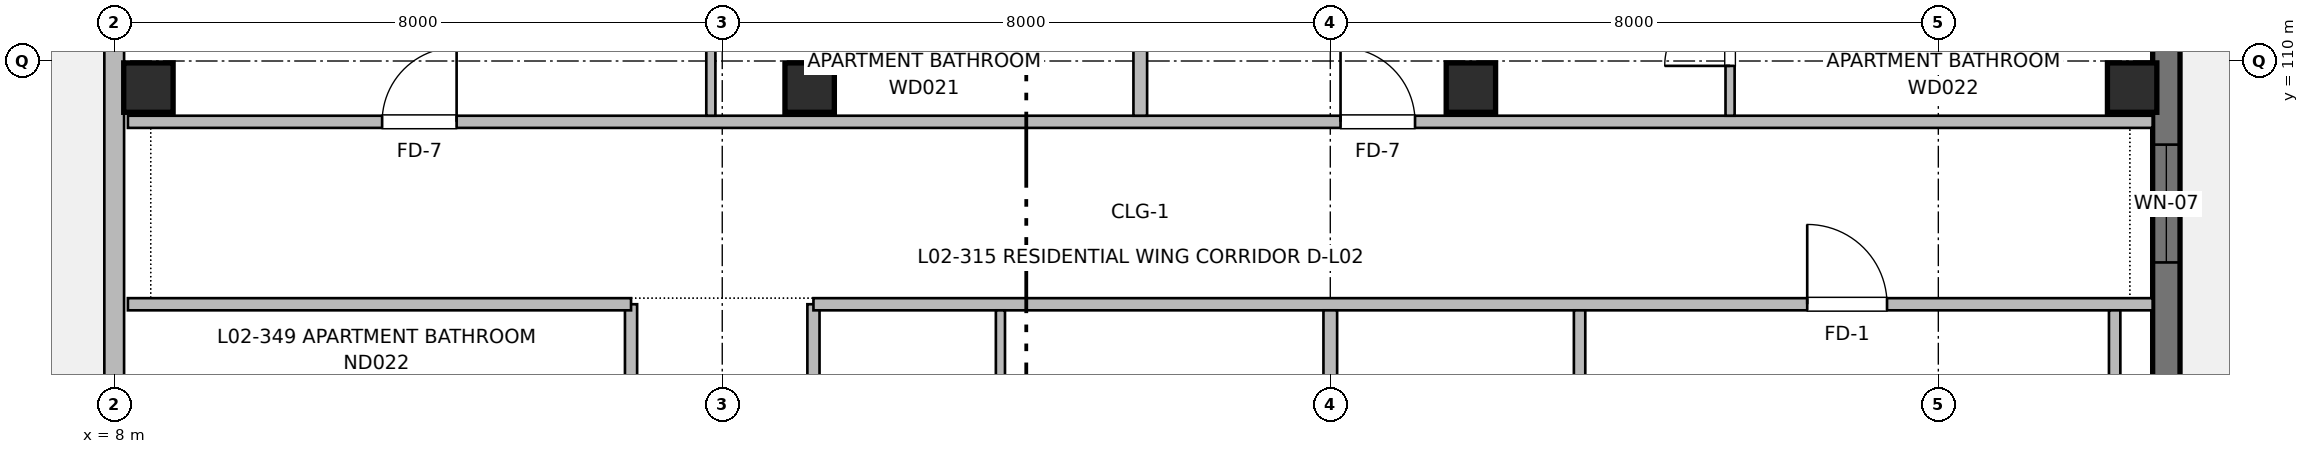
"""IFC4 building model, lengths in metres.
Left out: names, types, materials, properties, quantities, classifications, styles, units other than length and angle.
Written with IfcOpenShell. Run it as: python <this file> out.ifc"""

import sys

from ifc_helpers import new_model, si_unit, direction, frame, frame_2d, origin, origin_2d, place, context, subcontext, project, spatial, rectangle, extrude, element, fill, save


model = new_model("IFC4")
c1 = context("Model", 3, precision=1e-05, world=origin(), true_north=direction((0.0, 1.0)))
c2 = subcontext(c1, "Body", "Model", "MODEL_VIEW")
j1 = project(units=[si_unit("LENGTHUNIT", "METRE"), si_unit("PLANEANGLEUNIT", "RADIAN")], contexts=[c1])
p1 = place(None, origin())
s1 = spatial("IfcSite", under=j1, at=p1, CompositionType="ELEMENT")
p2 = place(p1, origin())
s2 = spatial("IfcBuilding", under=s1, at=p2, CompositionType="ELEMENT")
p3 = place(p2, frame((0.0, 0.0, 7.36)))
s3 = spatial("IfcBuildingStorey", under=s2, at=p3, CompositionType="ELEMENT", Elevation=7.36)
for number, where, z_axis, x_axis in (
    (1, (8.45, 109.65, 0.0), (0.0, 0.0, 1.0), (1.0, 0.0, 0.0)),
    (2, (17.15, 109.65, 0.0), (0.0, 0.0, 1.0), (1.0, 0.0, 0.0)),
    (3, (25.85, 109.65, 0.0), (0.0, 0.0, 1.0), (1.0, 0.0, 0.0)),
    (4, (34.55, 109.65, 0.0), (0.0, 0.0, 1.0), (1.0, 0.0, 0.0)),
):
    element("IfcColumn", number, at=place(p3, frame(where, z_axis=z_axis, x_axis=x_axis)), inside=s3, PredefinedType="COLUMN", context=c2, shape_type="SweptSolid", body=[
        extrude(rectangle(XDim=0.65, YDim=0.65, at=origin_2d()), origin(), (0.0, 0.0, 1.0), 3.2),
    ])
p4 = place(p3, frame((35.0, 116.0, 0.0), z_axis=(0.0, 0.0, 1.0), x_axis=(0.0, -1.0, 0.0)))
e5 = element("IfcWall", 5, at=p4, inside=s3, PredefinedType="SHEAR", context=c2, shape_type="SweptSolid", body=[
    extrude(rectangle(XDim=16.0, YDim=0.36, at=frame_2d((8.0, 0.0))), origin(), (0.0, 0.0, 1.0), 2.98),
])
p5 = place(p4, frame((2.95, 0.0, 0.0)))
e6 = element("IfcOpeningElement", 6, at=p5, cuts=e5, PredefinedType="OPENING", context=c2, shape_type="SweptSolid", body=[
    extrude(rectangle(XDim=1.2, YDim=2.2, at=frame_2d((0.6, 1.1))), frame((0.0, 0.19, 0.0), z_axis=(0.0, -1.0, 0.0), x_axis=(1.0, 0.0, 0.0)), (0.0, 0.0, 1.0), 0.38),
])
p6 = place(p4, frame((7.1, 0.0, 0.82)))
e7 = element("IfcOpeningElement", 7, at=p6, cuts=e5, PredefinedType="OPENING", context=c2, shape_type="SweptSolid", body=[
    extrude(rectangle(XDim=1.55, YDim=1.4, at=frame_2d((0.775, 0.7))), frame((0.0, 0.19, 0.0), z_axis=(0.0, -1.0, 0.0), x_axis=(1.0, 0.0, 0.0)), (0.0, 0.0, 1.0), 0.38),
])
p7 = place(p4, frame((11.25, 0.0, 0.82)))
e8 = element("IfcOpeningElement", 8, at=p7, cuts=e5, PredefinedType="OPENING", context=c2, shape_type="SweptSolid", body=[
    extrude(rectangle(XDim=1.5, YDim=1.4, at=frame_2d((0.75, 0.7))), frame((0.0, 0.19, 0.0), z_axis=(0.0, -1.0, 0.0), x_axis=(1.0, 0.0, 0.0)), (0.0, 0.0, 1.0), 0.38),
])
p8 = place(p3, frame((8.0, 56.0, 0.0), z_axis=(0.0, 0.0, 1.0), x_axis=(0.0, 1.0, 0.0)))
e9 = element("IfcWall", 9, at=p8, inside=s3, PredefinedType="SOLIDWALL", context=c2, shape_type="SweptSolid", body=[
    extrude(rectangle(XDim=60.0, YDim=0.26, at=frame_2d((30.0, 0.0))), origin(), (0.0, 0.0, 1.0), 2.98),
])
p9 = place(p8, frame((4.886, 0.0, 0.0)))
e10 = element("IfcOpeningElement", 10, at=p9, cuts=e9, PredefinedType="OPENING", context=c2, shape_type="SweptSolid", body=[
    extrude(rectangle(XDim=1.2, YDim=2.2, at=frame_2d((0.6, 1.1))), frame((0.0, 0.14, 0.0), z_axis=(0.0, -1.0, 0.0), x_axis=(1.0, 0.0, 0.0)), (0.0, 0.0, 1.0), 0.28),
])
p10 = place(p8, frame((12.107, 0.0, 0.82)))
e11 = element("IfcOpeningElement", 11, at=p10, cuts=e9, PredefinedType="OPENING", context=c2, shape_type="SweptSolid", body=[
    extrude(rectangle(XDim=1.5, YDim=1.4, at=frame_2d((0.75, 0.7))), frame((0.0, 0.14, 0.0), z_axis=(0.0, -1.0, 0.0), x_axis=(1.0, 0.0, 0.0)), (0.0, 0.0, 1.0), 0.28),
])
p11 = place(p8, frame((19.804, 0.0, 0.82)))
e12 = element("IfcOpeningElement", 12, at=p11, cuts=e9, PredefinedType="OPENING", context=c2, shape_type="SweptSolid", body=[
    extrude(rectangle(XDim=1.55, YDim=1.4, at=frame_2d((0.775, 0.7))), frame((0.0, 0.14, 0.0), z_axis=(0.0, -1.0, 0.0), x_axis=(1.0, 0.0, 0.0)), (0.0, 0.0, 1.0), 0.28),
])
p12 = place(p8, frame((29.3, 0.0, 0.87)))
e13 = element("IfcOpeningElement", 13, at=p12, cuts=e9, PredefinedType="OPENING", context=c2, shape_type="SweptSolid", body=[
    extrude(rectangle(XDim=1.4, YDim=1.35, at=frame_2d((0.7, 0.675))), frame((0.0, 0.14, 0.0), z_axis=(0.0, -1.0, 0.0), x_axis=(1.0, 0.0, 0.0)), (0.0, 0.0, 1.0), 0.28),
])
p13 = place(p8, frame((40.946, 0.0, 0.87)))
e14 = element("IfcOpeningElement", 14, at=p13, cuts=e9, PredefinedType="OPENING", context=c2, shape_type="SweptSolid", body=[
    extrude(rectangle(XDim=1.25, YDim=1.35, at=frame_2d((0.625, 0.675))), frame((0.0, 0.14, 0.0), z_axis=(0.0, -1.0, 0.0), x_axis=(1.0, 0.0, 0.0)), (0.0, 0.0, 1.0), 0.28),
])
p14 = place(p8, frame((46.493, 0.0, 0.82)))
e15 = element("IfcOpeningElement", 15, at=p14, cuts=e9, PredefinedType="OPENING", context=c2, shape_type="SweptSolid", body=[
    extrude(rectangle(XDim=1.3, YDim=1.4, at=frame_2d((0.65, 0.7))), frame((0.0, 0.14, 0.0), z_axis=(0.0, -1.0, 0.0), x_axis=(1.0, 0.0, 0.0)), (0.0, 0.0, 1.0), 0.28),
])
p15 = place(p8, frame((55.514, 0.0, 0.67)))
e16 = element("IfcOpeningElement", 16, at=p15, cuts=e9, PredefinedType="OPENING", context=c2, shape_type="SweptSolid", body=[
    extrude(rectangle(XDim=2.1, YDim=1.55, at=frame_2d((1.05, 0.775))), frame((0.0, 0.14, 0.0), z_axis=(0.0, -1.0, 0.0), x_axis=(1.0, 0.0, 0.0)), (0.0, 0.0, 1.0), 0.28),
])
p16 = place(p3, frame((14.8, 56.18, 0.0), z_axis=(0.0, 0.0, 1.0), x_axis=(0.0, 1.0, 0.0)))
e17 = element("IfcWall", 17, at=p16, inside=s3, PredefinedType="PARTITIONING", context=c2, shape_type="SweptSolid", body=[
    extrude(rectangle(XDim=50.62, YDim=0.16, at=frame_2d((25.31, 0.0))), origin(), (0.0, 0.0, 1.0), 2.935),
])
p17 = place(p16, frame((12.82, 0.0, 0.0)))
e18 = element("IfcOpeningElement", 18, at=p17, cuts=e17, PredefinedType="OPENING", context=c2, shape_type="SweptSolid", body=[
    extrude(rectangle(XDim=1.1, YDim=2.15, at=frame_2d((0.55, 1.075))), frame((0.0, 0.09, 0.0), z_axis=(0.0, -1.0, 0.0), x_axis=(1.0, 0.0, 0.0)), (0.0, 0.0, 1.0), 0.18),
])
p18 = place(p16, frame((19.22, 0.0, 0.0)))
e19 = element("IfcOpeningElement", 19, at=p18, cuts=e17, PredefinedType="OPENING", context=c2, shape_type="SweptSolid", body=[
    extrude(rectangle(XDim=1.6, YDim=2.15, at=frame_2d((0.8, 1.075))), frame((0.0, 0.09, 0.0), z_axis=(0.0, -1.0, 0.0), x_axis=(1.0, 0.0, 0.0)), (0.0, 0.0, 1.0), 0.18),
])
p19 = place(p16, frame((1.8, 0.0, 0.0)))
e20 = element("IfcOpeningElement", 20, at=p19, cuts=e17, PredefinedType="OPENING", context=c2, shape_type="SweptSolid", body=[
    extrude(rectangle(XDim=0.96, YDim=2.15, at=frame_2d((0.48, 1.075))), frame((0.0, 0.09, 0.0), z_axis=(0.0, -1.0, 0.0), x_axis=(1.0, 0.0, 0.0)), (0.0, 0.0, 1.0), 0.18),
])
p20 = place(p16, frame((32.625, 0.0, 0.0)))
e21 = element("IfcOpeningElement", 21, at=p20, cuts=e17, PredefinedType="OPENING", context=c2, shape_type="SweptSolid", body=[
    extrude(rectangle(XDim=0.98, YDim=2.15, at=frame_2d((0.49, 1.075))), frame((0.0, 0.09, 0.0), z_axis=(0.0, -1.0, 0.0), x_axis=(1.0, 0.0, 0.0)), (0.0, 0.0, 1.0), 0.18),
])
p21 = place(p16, frame((41.235, 0.0, 0.0)))
e22 = element("IfcOpeningElement", 22, at=p21, cuts=e17, PredefinedType="OPENING", context=c2, shape_type="SweptSolid", body=[
    extrude(rectangle(XDim=0.98, YDim=2.15, at=frame_2d((0.49, 1.075))), frame((0.0, 0.09, 0.0), z_axis=(0.0, -1.0, 0.0), x_axis=(1.0, 0.0, 0.0)), (0.0, 0.0, 1.0), 0.18),
])
p22 = place(p3, frame((17.2, 56.18, 0.0), z_axis=(0.0, 0.0, 1.0), x_axis=(0.0, 1.0, 0.0)))
e23 = element("IfcWall", 23, at=p22, inside=s3, PredefinedType="PARTITIONING", context=c2, shape_type="SweptSolid", body=[
    extrude(rectangle(XDim=50.62, YDim=0.16, at=frame_2d((25.31, 0.0))), origin(), (0.0, 0.0, 1.0), 2.935),
])
p23 = place(p22, frame((7.68, 0.0, 0.0)))
e24 = element("IfcOpeningElement", 24, at=p23, cuts=e23, PredefinedType="OPENING", context=c2, shape_type="SweptSolid", body=[
    extrude(rectangle(XDim=0.98, YDim=2.15, at=frame_2d((0.49, 1.075))), frame((0.0, 0.09, 0.0), z_axis=(0.0, -1.0, 0.0), x_axis=(1.0, 0.0, 0.0)), (0.0, 0.0, 1.0), 0.18),
])
p24 = place(p22, frame((22.43, 0.0, 0.0)))
e25 = element("IfcOpeningElement", 25, at=p24, cuts=e23, PredefinedType="OPENING", context=c2, shape_type="SweptSolid", body=[
    extrude(rectangle(XDim=0.98, YDim=2.15, at=frame_2d((0.49, 1.075))), frame((0.0, 0.09, 0.0), z_axis=(0.0, -1.0, 0.0), x_axis=(1.0, 0.0, 0.0)), (0.0, 0.0, 1.0), 0.18),
])
p25 = place(p22, frame((35.65, 0.0, 0.0)))
e26 = element("IfcOpeningElement", 26, at=p25, cuts=e23, PredefinedType="OPENING", context=c2, shape_type="SweptSolid", body=[
    extrude(rectangle(XDim=0.98, YDim=2.15, at=frame_2d((0.49, 1.075))), frame((0.0, 0.09, 0.0), z_axis=(0.0, -1.0, 0.0), x_axis=(1.0, 0.0, 0.0)), (0.0, 0.0, 1.0), 0.18),
])
p26 = place(p22, frame((46.42, 0.0, 0.0)))
e27 = element("IfcOpeningElement", 27, at=p26, cuts=e23, PredefinedType="OPENING", context=c2, shape_type="SweptSolid", body=[
    extrude(rectangle(XDim=0.98, YDim=2.15, at=frame_2d((0.49, 1.075))), frame((0.0, 0.09, 0.0), z_axis=(0.0, -1.0, 0.0), x_axis=(1.0, 0.0, 0.0)), (0.0, 0.0, 1.0), 0.18),
])
p27 = place(p3, frame((8.18, 106.8, 0.0), z_axis=(0.0, 0.0, 1.0), x_axis=(1.0, 0.0, 0.0)))
e28 = element("IfcWall", 28, at=p27, inside=s3, PredefinedType="PARTITIONING", context=c2, shape_type="SweptSolid", body=[
    extrude(rectangle(XDim=6.62, YDim=0.16, at=frame_2d((3.31, 0.0))), origin(), (0.0, 0.0, 1.0), 2.935),
])
p28 = place(p3, frame((17.2, 106.8, 0.0), z_axis=(0.0, 0.0, 1.0), x_axis=(1.0, 0.0, 0.0)))
e29 = element("IfcWall", 29, at=p28, inside=s3, PredefinedType="PARTITIONING", context=c2, shape_type="SweptSolid", body=[
    extrude(rectangle(XDim=17.62, YDim=0.16, at=frame_2d((8.81, 0.0))), origin(), (0.0, 0.0, 1.0), 2.935),
])
p29 = place(p28, frame((13.075, 0.0, 0.0)))
e30 = element("IfcOpeningElement", 30, at=p29, cuts=e29, PredefinedType="OPENING", context=c2, shape_type="SweptSolid", body=[
    extrude(rectangle(XDim=1.05, YDim=2.15, at=frame_2d((0.525, 1.075))), frame((0.0, 0.09, 0.0), z_axis=(0.0, -1.0, 0.0), x_axis=(1.0, 0.0, 0.0)), (0.0, 0.0, 1.0), 0.18),
])
p30 = place(p3, frame((8.18, 109.2, 0.0), z_axis=(0.0, 0.0, 1.0), x_axis=(1.0, 0.0, 0.0)))
e31 = element("IfcWall", 31, at=p30, inside=s3, PredefinedType="PARTITIONING", context=c2, shape_type="SweptSolid", body=[
    extrude(rectangle(XDim=26.64, YDim=0.16, at=frame_2d((13.32, 0.0))), origin(), (0.0, 0.0, 1.0), 2.935),
])
p31 = place(p30, frame((3.345, 0.0, 0.0)))
e32 = element("IfcOpeningElement", 32, at=p31, cuts=e31, PredefinedType="OPENING", context=c2, shape_type="SweptSolid", body=[
    extrude(rectangle(XDim=0.98, YDim=2.15, at=frame_2d((0.49, 1.075))), frame((0.0, 0.09, 0.0), z_axis=(0.0, -1.0, 0.0), x_axis=(1.0, 0.0, 0.0)), (0.0, 0.0, 1.0), 0.18),
])
p32 = place(p30, frame((15.955, 0.0, 0.0)))
e33 = element("IfcOpeningElement", 33, at=p32, cuts=e31, PredefinedType="OPENING", context=c2, shape_type="SweptSolid", body=[
    extrude(rectangle(XDim=0.98, YDim=2.15, at=frame_2d((0.49, 1.075))), frame((0.0, 0.09, 0.0), z_axis=(0.0, -1.0, 0.0), x_axis=(1.0, 0.0, 0.0)), (0.0, 0.0, 1.0), 0.18),
])
p33 = place(p3, frame((24.0, 100.05, 0.0), z_axis=(0.0, 0.0, 1.0), x_axis=(0.0, 1.0, 0.0)))
e34 = element("IfcWall", 34, at=p33, inside=s3, PredefinedType="PARTITIONING", context=c2, shape_type="SweptSolid", body=[
    extrude(rectangle(XDim=6.67, YDim=0.18, at=frame_2d((3.335, 0.0))), origin(), (0.0, 0.0, 1.0), 2.935),
])
for number, where, z_axis, x_axis in (
    (35, (27.28, 103.99, 0.0), (0.0, 0.0, 1.0), (0.0, 1.0, 0.0)),
    (36, (34.32, 103.99, 0.0), (0.0, 0.0, 1.0), (0.0, 1.0, 0.0)),
):
    element("IfcWall", number, at=place(p3, frame(where, z_axis=z_axis, x_axis=x_axis)), inside=s3, PredefinedType="PARTITIONING", context=c2, shape_type="SweptSolid", body=[
        extrude(rectangle(XDim=2.73, YDim=0.15, at=frame_2d((1.365, 0.0))), origin(), (0.0, 0.0, 1.0), 2.935),
    ])
p34 = place(p3, frame((19.66, 97.71, 0.0), z_axis=(0.0, 0.0, 1.0), x_axis=(0.0, 1.0, 0.0)))
e37 = element("IfcWall", 37, at=p34, inside=s3, PredefinedType="PARTITIONING", context=c2, shape_type="SweptSolid", body=[
    extrude(rectangle(XDim=9.01, YDim=0.12, at=frame_2d((4.505, 0.0))), origin(), (0.0, 0.0, 1.0), 2.935),
])
p35 = place(p34, frame((1.573, 0.0, 0.0)))
e38 = element("IfcOpeningElement", 38, at=p35, cuts=e37, PredefinedType="OPENING", context=c2, shape_type="SweptSolid", body=[
    extrude(rectangle(XDim=0.86, YDim=2.1, at=frame_2d((0.43, 1.05))), frame((0.0, 0.07, 0.0), z_axis=(0.0, -1.0, 0.0), x_axis=(1.0, 0.0, 0.0)), (0.0, 0.0, 1.0), 0.14),
])
p36 = place(p34, frame((5.504, 0.0, 0.0)))
e39 = element("IfcOpeningElement", 39, at=p36, cuts=e37, PredefinedType="OPENING", context=c2, shape_type="SweptSolid", body=[
    extrude(rectangle(XDim=0.92, YDim=2.1, at=frame_2d((0.46, 1.05))), frame((0.0, 0.07, 0.0), z_axis=(0.0, -1.0, 0.0), x_axis=(1.0, 0.0, 0.0)), (0.0, 0.0, 1.0), 0.14),
])
p37 = place(p3, frame((21.5, 109.28, 0.0), z_axis=(0.0, 0.0, 1.0), x_axis=(0.0, 1.0, 0.0)))
e40 = element("IfcWall", 40, at=p37, inside=s3, PredefinedType="PARTITIONING", context=c2, shape_type="SweptSolid", body=[
    extrude(rectangle(XDim=6.59, YDim=0.18, at=frame_2d((3.295, 0.0))), origin(), (0.0, 0.0, 1.0), 2.67),
])
p38 = place(p3, frame((15.85, 109.28, 0.0), z_axis=(0.0, 0.0, 1.0), x_axis=(0.0, 1.0, 0.0)))
e41 = element("IfcWall", 41, at=p38, inside=s3, PredefinedType="PARTITIONING", context=c2, shape_type="SweptSolid", body=[
    extrude(rectangle(XDim=6.59, YDim=0.12, at=frame_2d((3.295, 0.0))), origin(), (0.0, 0.0, 1.0), 2.935),
])
p39 = place(p38, frame((2.306, 0.0, 0.0)))
e42 = element("IfcOpeningElement", 42, at=p39, cuts=e41, PredefinedType="OPENING", context=c2, shape_type="SweptSolid", body=[
    extrude(rectangle(XDim=0.86, YDim=2.1, at=frame_2d((0.43, 1.05))), frame((0.0, 0.07, 0.0), z_axis=(0.0, -1.0, 0.0), x_axis=(1.0, 0.0, 0.0)), (0.0, 0.0, 1.0), 0.14),
])
p40 = place(p38, frame((4.093, 0.0, 0.0)))
e43 = element("IfcOpeningElement", 43, at=p40, cuts=e41, PredefinedType="OPENING", context=c2, shape_type="SweptSolid", body=[
    extrude(rectangle(XDim=0.9, YDim=2.1, at=frame_2d((0.45, 1.05))), frame((0.0, 0.07, 0.0), z_axis=(0.0, -1.0, 0.0), x_axis=(1.0, 0.0, 0.0)), (0.0, 0.0, 1.0), 0.14),
])
p41 = place(p3, frame((29.26, 109.28, 0.0), z_axis=(0.0, 0.0, 1.0), x_axis=(0.0, 1.0, 0.0)))
e44 = element("IfcWall", 44, at=p41, inside=s3, PredefinedType="PARTITIONING", context=c2, shape_type="SweptSolid", body=[
    extrude(rectangle(XDim=6.59, YDim=0.12, at=frame_2d((3.295, 0.0))), origin(), (0.0, 0.0, 1.0), 2.935),
])
p42 = place(p41, frame((0.656, 0.0, 0.0)))
e45 = element("IfcOpeningElement", 45, at=p42, cuts=e44, PredefinedType="OPENING", context=c2, shape_type="SweptSolid", body=[
    extrude(rectangle(XDim=0.86, YDim=2.1, at=frame_2d((0.43, 1.05))), frame((0.0, 0.07, 0.0), z_axis=(0.0, -1.0, 0.0), x_axis=(1.0, 0.0, 0.0)), (0.0, 0.0, 1.0), 0.14),
])
p43 = place(p41, frame((4.093, 0.0, 0.0)))
e46 = element("IfcOpeningElement", 46, at=p43, cuts=e44, PredefinedType="OPENING", context=c2, shape_type="SweptSolid", body=[
    extrude(rectangle(XDim=0.9, YDim=2.1, at=frame_2d((0.45, 1.05))), frame((0.0, 0.07, 0.0), z_axis=(0.0, -1.0, 0.0), x_axis=(1.0, 0.0, 0.0)), (0.0, 0.0, 1.0), 0.14),
])
p44 = place(p6, origin())
e47 = element("IfcWindow", 47, at=p44, inside=s3, PartitioningType="SINGLE_PANEL", PredefinedType="WINDOW", context=c2, shape_type="SweptSolid", body=[
    extrude(rectangle(XDim=1.55, YDim=1.4, at=frame_2d((0.775, 0.7))), frame((0.0, 0.03, 0.0), z_axis=(0.0, -1.0, 0.0), x_axis=(1.0, 0.0, 0.0)), (0.0, 0.0, 1.0), 0.06),
])
fill(e7, e47)
p45 = place(p29, origin())
e48 = element("IfcDoor", 48, at=p45, inside=s3, OperationType="SINGLE_SWING_LEFT", PredefinedType="DOOR", context=c2, shape_type="SweptSolid", body=[
    extrude(rectangle(XDim=1.05, YDim=2.15, at=frame_2d((0.525, 1.075))), frame((0.0, 0.025, 0.0), z_axis=(0.0, -1.0, 0.0), x_axis=(1.0, 0.0, 0.0)), (0.0, 0.0, 1.0), 0.05),
])
fill(e30, e48)
p46 = place(p31, origin())
e49 = element("IfcDoor", 49, at=p46, inside=s3, OperationType="SINGLE_SWING_RIGHT", PredefinedType="DOOR", context=c2, shape_type="SweptSolid", body=[
    extrude(rectangle(XDim=0.98, YDim=2.15, at=frame_2d((0.49, 1.075))), frame((0.0, 0.025, 0.0), z_axis=(0.0, -1.0, 0.0), x_axis=(1.0, 0.0, 0.0)), (0.0, 0.0, 1.0), 0.05),
])
fill(e32, e49)
p47 = place(p32, origin())
e50 = element("IfcDoor", 50, at=p47, inside=s3, OperationType="SINGLE_SWING_LEFT", PredefinedType="DOOR", context=c2, shape_type="SweptSolid", body=[
    extrude(rectangle(XDim=0.98, YDim=2.15, at=frame_2d((0.49, 1.075))), frame((0.0, 0.025, 0.0), z_axis=(0.0, -1.0, 0.0), x_axis=(1.0, 0.0, 0.0)), (0.0, 0.0, 1.0), 0.05),
])
fill(e33, e50)
p48 = place(p42, origin())
e51 = element("IfcDoor", 51, at=p48, inside=s3, OperationType="SINGLE_SWING_LEFT", PredefinedType="DOOR", context=c2, shape_type="SweptSolid", body=[
    extrude(rectangle(XDim=0.86, YDim=2.1, at=frame_2d((0.43, 1.05))), frame((0.0, 0.025, 0.0), z_axis=(0.0, -1.0, 0.0), x_axis=(1.0, 0.0, 0.0)), (0.0, 0.0, 1.0), 0.05),
])
fill(e45, e51)
save(model, sys.argv[1])
